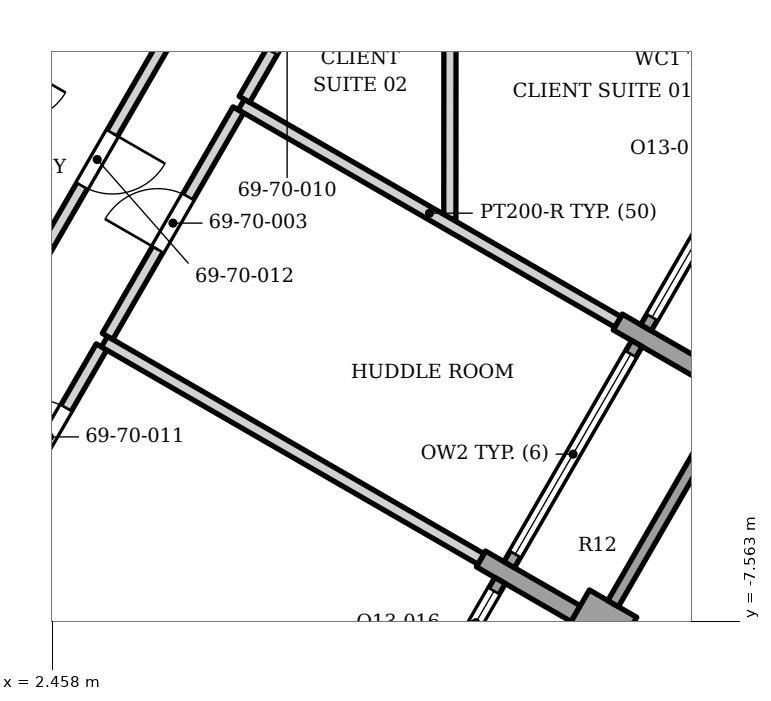
"""IFC4 building model, lengths in metres.
Left out: names, types, materials, properties, quantities, classifications, styles, units other than length and angle.
Written with IfcOpenShell. Run it as: python <this file> out.ifc"""

import sys

from ifc_helpers import new_model, si_unit, direction, frame, frame_2d, origin, place, context, subcontext, project, spatial, rectangle, extrude, element, fill, save


model = new_model("IFC4")
c1 = context("Model", 3, precision=1e-05, world=origin(), true_north=direction((0.0, 1.0)))
c2 = subcontext(c1, "Body", "Model", "MODEL_VIEW")
j1 = project(units=[si_unit("LENGTHUNIT", "METRE"), si_unit("PLANEANGLEUNIT", "RADIAN")], contexts=[c1])
p1 = place(None, origin())
s1 = spatial("IfcSite", under=j1, at=p1, CompositionType="ELEMENT")
p2 = place(p1, origin())
s2 = spatial("IfcBuilding", under=s1, at=p2, CompositionType="ELEMENT")
p3 = place(p2, frame((0.0, 0.0, 287.2)))
s3 = spatial("IfcBuildingStorey", under=s2, at=p3, CompositionType="ELEMENT", Elevation=287.2)
p4 = place(p3, frame((11.068, -7.437, 0.0), z_axis=(0.0, 0.0, 1.0), x_axis=(0.866081705922, -0.499902469156, 0.0)))
e1 = element("IfcWall", 1, at=p4, inside=s3, PredefinedType="SOLIDWALL", context=c2, shape_type="SweptSolid", body=[
    extrude(rectangle(XDim=0.9, YDim=0.9, at=frame_2d((0.45, 0.0))), origin(), (0.0, 0.0, 1.0), 2.974),
])
p5 = place(p3, frame((11.068, -7.437, 0.0), z_axis=(0.0, 0.0, 1.0), x_axis=(-0.866047807691, 0.499961193289, 0.0)))
e2 = element("IfcWall", 2, at=p5, inside=s3, PredefinedType="SOLIDWALL", context=c2, shape_type="SweptSolid", body=[
    extrude(rectangle(XDim=1.8, YDim=0.3, at=frame_2d((0.9, 0.0))), origin(), (0.0, 0.0, 1.0), 3.0),
])
p6 = place(p3, frame((11.759, -2.64, 0.0), z_axis=(0.0, 0.0, 1.0), x_axis=(0.866038726271, -0.499976924066, 0.0)))
e3 = element("IfcWall", 3, at=p6, inside=s3, PredefinedType="SOLIDWALL", context=c2, shape_type="SweptSolid", body=[
    extrude(rectangle(XDim=1.799, YDim=0.3, at=frame_2d((0.9, 0.0))), origin(), (0.0, 0.0, 1.0), 3.0),
])
p7 = place(p3, frame((7.724, -10.529, 0.0), z_axis=(0.0, 0.0, 1.0), x_axis=(0.49998411664, 0.866034573852, 0.0)))
e4 = element("IfcWall", 4, at=p7, inside=s3, PredefinedType="ELEMENTEDWALL", context=c2, shape_type="SweptSolid", body=[
    extrude(rectangle(XDim=4.2, YDim=0.2, at=frame_2d((2.1, 0.0))), origin(), (0.0, 0.0, 1.0), 2.974),
])
p8 = place(p7, frame((0.2, 0.0, 0.45)))
e5 = element("IfcOpeningElement", 5, at=p8, cuts=e4, PredefinedType="OPENING", context=c2, shape_type="SweptSolid", body=[
    extrude(rectangle(XDim=2.4, YDim=2.25, at=frame_2d((1.2, 1.125))), frame((0.0, 0.11, 0.0), z_axis=(0.0, -1.0, 0.0), x_axis=(1.0, 0.0, 0.0)), (0.0, 0.0, 1.0), 0.22),
])
p9 = place(p7, frame((2.8, 0.0, 0.0)))
e6 = element("IfcOpeningElement", 6, at=p9, cuts=e4, PredefinedType="OPENING", context=c2, shape_type="SweptSolid", body=[
    extrude(rectangle(XDim=1.2, YDim=2.7, at=frame_2d((0.6, 1.35))), frame((0.0, 0.11, 0.0), z_axis=(0.0, -1.0, 0.0), x_axis=(1.0, 0.0, 0.0)), (0.0, 0.0, 1.0), 0.22),
])
p10 = place(p3, frame((11.683, -7.272, 0.0), z_axis=(0.0, 0.0, 1.0), x_axis=(0.500012057535, 0.866018442252, 0.0)))
e7 = element("IfcWall", 7, at=p10, inside=s3, PredefinedType="SOLIDWALL", context=c2, shape_type="SweptSolid", body=[
    extrude(rectangle(XDim=3.6, YDim=0.2, at=frame_2d((1.8, 0.0))), origin(), (0.0, 0.0, 1.0), 3.0),
])
p11 = place(p3, frame((9.974, -6.632, 0.0), z_axis=(0.0, 0.0, 1.0), x_axis=(0.49998411664, 0.866034573852, 0.0)))
e8 = element("IfcWall", 8, at=p11, inside=s3, PredefinedType="ELEMENTEDWALL", context=c2, shape_type="SweptSolid", body=[
    extrude(rectangle(XDim=4.2, YDim=0.2, at=frame_2d((2.1, 0.0))), origin(), (0.0, 0.0, 1.0), 2.974),
])
p12 = place(p11, frame((0.2, 0.0, 0.45)))
e9 = element("IfcOpeningElement", 9, at=p12, cuts=e8, PredefinedType="OPENING", context=c2, shape_type="SweptSolid", body=[
    extrude(rectangle(XDim=3.8, YDim=2.25, at=frame_2d((1.9, 1.125))), frame((0.0, 0.11, 0.0), z_axis=(0.0, -1.0, 0.0), x_axis=(1.0, 0.0, 0.0)), (0.0, 0.0, 1.0), 0.22),
])
p13 = place(p3, frame((12.224, -2.735, 0.0), z_axis=(0.0, 0.0, 1.0), x_axis=(0.499958946799, 0.866049104564, 0.0)))
e10 = element("IfcWall", 10, at=p13, inside=s3, PredefinedType="ELEMENTEDWALL", context=c2, shape_type="SweptSolid", body=[
    extrude(rectangle(XDim=4.2, YDim=0.2, at=frame_2d((2.1, 0.0))), origin(), (0.0, 0.0, 1.0), 3.0),
])
p14 = place(p13, frame((0.2, 0.0, 0.45)))
e11 = element("IfcOpeningElement", 11, at=p14, cuts=e10, PredefinedType="OPENING", context=c2, shape_type="SweptSolid", body=[
    extrude(rectangle(XDim=2.4, YDim=2.25, at=frame_2d((1.2, 1.125))), frame((0.0, 0.11, 0.0), z_axis=(0.0, -1.0, 0.0), x_axis=(1.0, 0.0, 0.0)), (0.0, 0.0, 1.0), 0.22),
])
p15 = place(p13, frame((2.8, 0.0, 0.0)))
e12 = element("IfcOpeningElement", 12, at=p15, cuts=e10, PredefinedType="OPENING", context=c2, shape_type="SweptSolid", body=[
    extrude(rectangle(XDim=1.2, YDim=2.7, at=frame_2d((0.6, 1.35))), frame((0.0, 0.11, 0.0), z_axis=(0.0, -1.0, 0.0), x_axis=(1.0, 0.0, 0.0)), (0.0, 0.0, 1.0), 0.22),
])
p16 = place(p3, frame((1.508, -6.097, 0.0), z_axis=(0.0, 0.0, 1.0), x_axis=(0.500420898521, 0.865782261497, 0.0)))
e13 = element("IfcWall", 13, at=p16, inside=s3, PredefinedType="PARTITIONING", context=c2, shape_type="SweptSolid", body=[
    extrude(rectangle(XDim=3.52, YDim=0.2, at=frame_2d((1.76, 0.0))), origin(), (0.0, 0.0, 1.0), 2.742),
])
p17 = place(p16, frame((1.26, 0.0, 0.0)))
e14 = element("IfcOpeningElement", 14, at=p17, cuts=e13, PredefinedType="OPENING", context=c2, shape_type="SweptSolid", body=[
    extrude(rectangle(XDim=1.1, YDim=2.1, at=frame_2d((0.55, 1.05))), frame((0.0, 0.11, 0.0), z_axis=(0.0, -1.0, 0.0), x_axis=(1.0, 0.0, 0.0)), (0.0, 0.0, 1.0), 0.22),
])
p18 = place(p3, frame((1.126, -3.556, 0.0), z_axis=(0.0, 0.0, 1.0), x_axis=(0.500008091576, 0.86602073206, 0.0)))
e15 = element("IfcWall", 15, at=p18, inside=s3, PredefinedType="PARTITIONING", context=c2, shape_type="SweptSolid", body=[
    extrude(rectangle(XDim=8.286, YDim=0.2, at=frame_2d((4.143, 0.0))), origin(), (0.0, 0.0, 1.0), 2.742),
])
p19 = place(p18, frame((3.643, 0.0, 0.0)))
e16 = element("IfcOpeningElement", 16, at=p19, cuts=e15, PredefinedType="OPENING", context=c2, shape_type="SweptSolid", body=[
    extrude(rectangle(XDim=1.0, YDim=2.1, at=frame_2d((0.5, 1.05))), frame((0.0, 0.11, 0.0), z_axis=(0.0, -1.0, 0.0), x_axis=(1.0, 0.0, 0.0)), (0.0, 0.0, 1.0), 0.22),
])
p20 = place(p3, frame((3.317, -2.964, 0.0), z_axis=(0.0, 0.0, 1.0), x_axis=(0.8661275932, -0.499822960955, 0.0)))
e17 = element("IfcWall", 17, at=p20, inside=s3, PredefinedType="PARTITIONING", context=c2, shape_type="SweptSolid", body=[
    extrude(rectangle(XDim=7.149, YDim=0.2, at=frame_2d((3.575, 0.0))), origin(), (0.0, 0.0, 1.0), 2.742),
])
p21 = place(p3, frame((8.998, -0.943, 0.0), z_axis=(0.0, 0.0, 1.0), x_axis=(0.000580671822, 0.99999983141, 0.0)))
e18 = element("IfcWall", 18, at=p21, inside=s3, PredefinedType="PARTITIONING", context=c2, shape_type="SweptSolid", body=[
    extrude(rectangle(XDim=2.943, YDim=0.2, at=frame_2d((1.472, 0.0))), origin(), (0.0, 0.0, 1.0), 2.974),
])
p22 = place(p3, frame((3.369, -2.876, 0.0), z_axis=(0.0, 0.0, 1.0), x_axis=(0.500028799954, 0.866008775485, 0.0)))
e19 = element("IfcWall", 19, at=p22, inside=s3, PredefinedType="PARTITIONING", context=c2, shape_type="SweptSolid", body=[
    extrude(rectangle(XDim=4.3, YDim=0.2, at=frame_2d((2.15, 0.0))), origin(), (0.0, 0.0, 1.0), 2.742),
])
p23 = place(p22, frame((1.65, 0.0, 0.0)))
e20 = element("IfcOpeningElement", 20, at=p23, cuts=e19, PredefinedType="OPENING", context=c2, shape_type="SweptSolid", body=[
    extrude(rectangle(XDim=1.0, YDim=2.1, at=frame_2d((0.5, 1.05))), frame((0.0, 0.11, 0.0), z_axis=(0.0, -1.0, 0.0), x_axis=(1.0, 0.0, 0.0)), (0.0, 0.0, 1.0), 0.22),
])
p24 = place(p3, frame((5.569, 0.937, 0.0), z_axis=(0.0, 0.0, 1.0), x_axis=(0.866028067963, -0.499995385478, 0.0)))
e21 = element("IfcWall", 21, at=p24, inside=s3, PredefinedType="PARTITIONING", context=c2, shape_type="SweptSolid", body=[
    extrude(rectangle(XDim=7.149, YDim=0.2, at=frame_2d((3.575, 0.0))), origin(), (0.0, 0.0, 1.0), 2.742),
])
p25 = place(p3, frame((5.619, 1.021, 0.0), z_axis=(0.0, 0.0, 1.0), x_axis=(0.499589520325, 0.866262264664, 0.0)))
e22 = element("IfcWall", 22, at=p25, inside=s3, PredefinedType="PARTITIONING", context=c2, shape_type="SweptSolid", body=[
    extrude(rectangle(XDim=2.915, YDim=0.2, at=frame_2d((1.458, 0.0))), origin(), (0.0, 0.0, 1.0), 2.742),
])
p26 = place(p25, frame((0.906, 0.0, 0.0)))
e23 = element("IfcOpeningElement", 23, at=p26, cuts=e22, PredefinedType="OPENING", context=c2, shape_type="SweptSolid", body=[
    extrude(rectangle(XDim=1.0, YDim=2.1, at=frame_2d((0.5, 1.05))), frame((0.0, 0.11, 0.0), z_axis=(0.0, -1.0, 0.0), x_axis=(1.0, 0.0, 0.0)), (0.0, 0.0, 1.0), 0.22),
])
p27 = place(p9, origin())
e24 = element("IfcDoor", 24, at=p27, inside=s3, OperationType="SINGLE_SWING_LEFT", PredefinedType="DOOR", context=c2, shape_type="SweptSolid", body=[
    extrude(rectangle(XDim=1.2, YDim=2.7, at=frame_2d((0.6, 1.35))), frame((0.0, 0.025, 0.0), z_axis=(0.0, -1.0, 0.0), x_axis=(1.0, 0.0, 0.0)), (0.0, 0.0, 1.0), 0.05),
])
fill(e6, e24)
p28 = place(p12, origin())
e25 = element("IfcWindow", 25, at=p28, inside=s3, PartitioningType="SINGLE_PANEL", PredefinedType="WINDOW", context=c2, shape_type="SweptSolid", body=[
    extrude(rectangle(XDim=3.8, YDim=2.25, at=frame_2d((1.9, 1.125))), frame((0.0, 0.03, 0.0), z_axis=(0.0, -1.0, 0.0), x_axis=(1.0, 0.0, 0.0)), (0.0, 0.0, 1.0), 0.06),
])
fill(e9, e25)
p29 = place(p14, origin())
e26 = element("IfcWindow", 26, at=p29, inside=s3, PartitioningType="SINGLE_PANEL", PredefinedType="WINDOW", context=c2, shape_type="SweptSolid", body=[
    extrude(rectangle(XDim=2.4, YDim=2.25, at=frame_2d((1.2, 1.125))), frame((0.0, 0.03, 0.0), z_axis=(0.0, -1.0, 0.0), x_axis=(1.0, 0.0, 0.0)), (0.0, 0.0, 1.0), 0.06),
])
fill(e11, e26)
p30 = place(p23, origin())
e27 = element("IfcDoor", 27, at=p30, inside=s3, OperationType="SINGLE_SWING_LEFT", PredefinedType="DOOR", context=c2, shape_type="SweptSolid", body=[
    extrude(rectangle(XDim=1.0, YDim=2.1, at=frame_2d((0.5, 1.05))), frame((0.0, 0.025, 0.0), z_axis=(0.0, -1.0, 0.0), x_axis=(1.0, 0.0, 0.0)), (0.0, 0.0, 1.0), 0.05),
])
fill(e20, e27)
p31 = place(p26, origin())
e28 = element("IfcDoor", 28, at=p31, inside=s3, OperationType="SINGLE_SWING_LEFT", PredefinedType="DOOR", context=c2, shape_type="SweptSolid", body=[
    extrude(rectangle(XDim=1.0, YDim=2.1, at=frame_2d((0.5, 1.05))), frame((0.0, 0.025, 0.0), z_axis=(0.0, -1.0, 0.0), x_axis=(1.0, 0.0, 0.0)), (0.0, 0.0, 1.0), 0.05),
])
fill(e23, e28)
p32 = place(p17, origin())
e29 = element("IfcDoor", 29, at=p32, inside=s3, OperationType="SINGLE_SWING_LEFT", PredefinedType="DOOR", context=c2, shape_type="SweptSolid", body=[
    extrude(rectangle(XDim=1.1, YDim=2.1, at=frame_2d((0.55, 1.05))), frame((0.0, 0.025, 0.0), z_axis=(0.0, -1.0, 0.0), x_axis=(1.0, 0.0, 0.0)), (0.0, 0.0, 1.0), 0.05),
])
fill(e14, e29)
p33 = place(p19, origin())
e30 = element("IfcDoor", 30, at=p33, inside=s3, OperationType="SINGLE_SWING_RIGHT", PredefinedType="DOOR", context=c2, shape_type="SweptSolid", body=[
    extrude(rectangle(XDim=1.0, YDim=2.1, at=frame_2d((0.5, 1.05))), frame((0.0, 0.025, 0.0), z_axis=(0.0, -1.0, 0.0), x_axis=(1.0, 0.0, 0.0)), (0.0, 0.0, 1.0), 0.05),
])
fill(e16, e30)
save(model, sys.argv[1])
